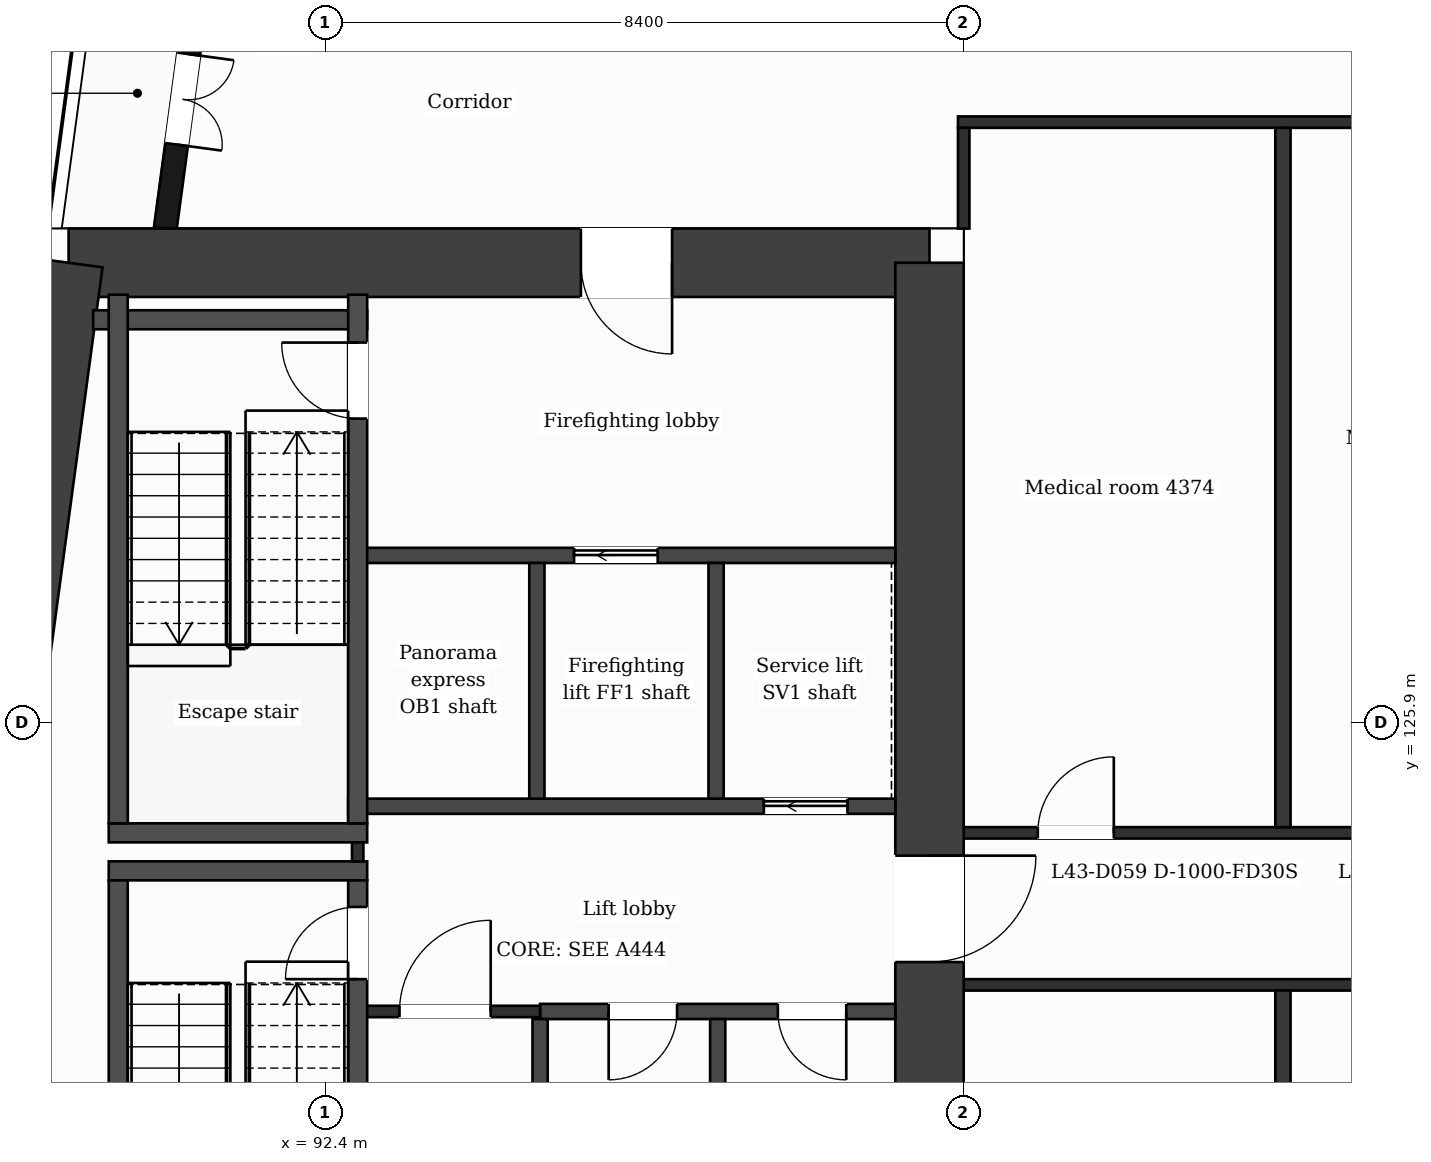
"""IFC4 building model, lengths in metres.
Left out: names, types, materials, properties, quantities, classifications, styles, units other than length and angle.
Written with IfcOpenShell. Run it as: python <this file> out.ifc"""

import sys

from ifc_helpers import new_model, si_unit, direction, frame, frame_2d, origin, place, context, subcontext, project, spatial, rectangle, extrude, element, fill, save


model = new_model("IFC4")
c1 = context("Model", 3, precision=1e-05, world=origin(), true_north=direction((0.0, 1.0)))
c2 = subcontext(c1, "Body", "Model", "MODEL_VIEW")
j1 = project(units=[si_unit("LENGTHUNIT", "METRE"), si_unit("PLANEANGLEUNIT", "RADIAN")], contexts=[c1])
p1 = place(None, origin())
s1 = spatial("IfcSite", under=j1, at=p1, CompositionType="ELEMENT")
p2 = place(p1, origin())
s2 = spatial("IfcBuilding", under=s1, at=p2, CompositionType="ELEMENT")
p3 = place(p2, frame((0.0, 0.0, 181.1)))
s3 = spatial("IfcBuildingStorey", under=s2, at=p3, CompositionType="ELEMENT", Elevation=181.1)
p4 = place(p3, frame((89.024, 131.95, 0.0), z_axis=(0.0, 0.0, 1.0), x_axis=(1.0, 0.0, 0.0)))
e1 = element("IfcWall", 1, at=p4, inside=s3, PredefinedType="SHEAR", context=c2, shape_type="SweptSolid", body=[
    extrude(rectangle(XDim=11.326, YDim=0.9, at=frame_2d((5.663, 0.0))), origin(), (0.0, 0.0, 1.0), 3.7),
])
p5 = place(p4, frame((6.739, 0.0, 0.0)))
e2 = element("IfcOpeningElement", 2, at=p5, cuts=e1, PredefinedType="OPENING", context=c2, shape_type="SweptSolid", body=[
    extrude(rectangle(XDim=1.2, YDim=2.1, at=frame_2d((0.6, 1.05))), frame((0.0, 0.46, 0.0), z_axis=(0.0, -1.0, 0.0), x_axis=(1.0, 0.0, 0.0)), (0.0, 0.0, 1.0), 0.92),
])
p6 = place(p3, frame((100.35, 131.95, 0.0), z_axis=(0.0, 0.0, 1.0), x_axis=(0.0, -1.0, 0.0)))
e3 = element("IfcWall", 3, at=p6, inside=s3, PredefinedType="SHEAR", context=c2, shape_type="SweptSolid", body=[
    extrude(rectangle(XDim=21.1, YDim=0.9, at=frame_2d((10.55, 0.0))), origin(), (0.0, 0.0, 1.0), 3.7),
])
p7 = place(p6, frame((7.8, 0.0, 0.0)))
e4 = element("IfcOpeningElement", 4, at=p7, cuts=e3, PredefinedType="OPENING", context=c2, shape_type="SweptSolid", body=[
    extrude(rectangle(XDim=1.4, YDim=2.1, at=frame_2d((0.7, 1.05))), frame((0.0, 0.46, 0.0), z_axis=(0.0, -1.0, 0.0), x_axis=(1.0, 0.0, 0.0)), (0.0, 0.0, 1.0), 0.92),
])
p8 = place(p3, frame((86.184, 110.85, 0.0), z_axis=(0.0, 0.0, 1.0), x_axis=(0.133410495943, 0.991060865725, 0.0)))
e5 = element("IfcWall", 5, at=p8, inside=s3, PredefinedType="SHEAR", context=c2, shape_type="SweptSolid", body=[
    extrude(rectangle(XDim=21.29, YDim=0.9, at=frame_2d((10.645, 0.0))), origin(), (0.0, 0.0, 1.0), 3.7),
])
p9 = place(p3, frame((91.177, 138.95, 0.0), z_axis=(0.0, 0.0, 1.0), x_axis=(-0.133426664613, -0.991058689065, 0.0)))
e6 = element("IfcWall", 6, at=p9, inside=s3, PredefinedType="SOLIDWALL", context=c2, shape_type="SweptSolid", body=[
    extrude(rectangle(XDim=6.609, YDim=0.3, at=frame_2d((3.305, 0.0))), origin(), (0.0, 0.0, 1.0), 3.38),
])
p10 = place(p9, frame((1.039, 0.0, 0.9)))
e7 = element("IfcOpeningElement", 7, at=p10, cuts=e6, PredefinedType="OPENING", context=c2, shape_type="SweptSolid", body=[
    extrude(rectangle(XDim=1.2, YDim=2.1, at=frame_2d((0.6, 1.05))), frame((0.0, 0.16, 0.0), z_axis=(0.0, -1.0, 0.0), x_axis=(1.0, 0.0, 0.0)), (0.0, 0.0, 1.0), 0.32),
])
p11 = place(p9, frame((4.294, 0.0, 0.0)))
e8 = element("IfcOpeningElement", 8, at=p11, cuts=e6, PredefinedType="OPENING", context=c2, shape_type="SweptSolid", body=[
    extrude(rectangle(XDim=1.2, YDim=2.4, at=frame_2d((0.6, 1.2))), frame((0.0, 0.16, 0.0), z_axis=(0.0, -1.0, 0.0), x_axis=(1.0, 0.0, 0.0)), (0.0, 0.0, 1.0), 0.32),
])
p12 = place(p3, frame((95.227, 122.1, 0.0), z_axis=(0.0, 0.0, 1.0), x_axis=(1.0, 0.0, 0.0)))
e9 = element("IfcWall", 9, at=p12, inside=s3, PredefinedType="PARTITIONING", context=c2, shape_type="SweptSolid", body=[
    extrude(rectangle(XDim=4.673, YDim=0.2, at=frame_2d((2.336, 0.0))), origin(), (0.0, 0.0, 1.0), 3.38),
])
p13 = place(p12, frame((0.902, 0.0, 0.0)))
e10 = element("IfcOpeningElement", 10, at=p13, cuts=e9, PredefinedType="OPENING", context=c2, shape_type="SweptSolid", body=[
    extrude(rectangle(XDim=0.9, YDim=2.1, at=frame_2d((0.45, 1.05))), frame((0.0, 0.11, 0.0), z_axis=(0.0, -1.0, 0.0), x_axis=(1.0, 0.0, 0.0)), (0.0, 0.0, 1.0), 0.22),
])
p14 = place(p12, frame((3.128, 0.0, 0.0)))
e11 = element("IfcOpeningElement", 11, at=p14, cuts=e9, PredefinedType="OPENING", context=c2, shape_type="SweptSolid", body=[
    extrude(rectangle(XDim=0.9, YDim=2.1, at=frame_2d((0.45, 1.05))), frame((0.0, 0.11, 0.0), z_axis=(0.0, -1.0, 0.0), x_axis=(1.0, 0.0, 0.0)), (0.0, 0.0, 1.0), 0.22),
])
p15 = place(p3, frame((92.827, 122.1, 0.0), z_axis=(0.0, 0.0, 1.0), x_axis=(1.0, 0.0, 0.0)))
e12 = element("IfcWall", 12, at=p15, inside=s3, PredefinedType="PARTITIONING", context=c2, shape_type="SweptSolid", body=[
    extrude(rectangle(XDim=2.4, YDim=0.15, at=frame_2d((1.2, 0.0))), origin(), (0.0, 0.0, 1.0), 3.38),
])
p16 = place(p15, frame((0.55, 0.0, 0.0)))
e13 = element("IfcOpeningElement", 13, at=p16, cuts=e12, PredefinedType="OPENING", context=c2, shape_type="SweptSolid", body=[
    extrude(rectangle(XDim=1.2, YDim=2.1, at=frame_2d((0.6, 1.05))), frame((0.0, 0.085, 0.0), z_axis=(0.0, -1.0, 0.0), x_axis=(1.0, 0.0, 0.0)), (0.0, 0.0, 1.0), 0.17),
])
p17 = place(p3, frame((100.8, 122.45, 0.0), z_axis=(0.0, 0.0, 1.0), x_axis=(1.0, 0.0, 0.0)))
e14 = element("IfcWall", 14, at=p17, inside=s3, PredefinedType="PARTITIONING", context=c2, shape_type="SweptSolid", body=[
    extrude(rectangle(XDim=25.2, YDim=0.15, at=frame_2d((12.6, 0.0))), origin(), (0.0, 0.0, 1.0), 3.38),
])
for number, where, z_axis, x_axis in (
    (15, (89.552, 123.95, 0.0), (0.0, 0.0, 1.0), (1.0, 0.0, 0.0)),
    (16, (89.552, 124.45, 0.0), (0.0, 0.0, 1.0), (1.0, 0.0, 0.0)),
):
    element("IfcWall", number, at=place(p3, frame(where, z_axis=z_axis, x_axis=x_axis)), inside=s3, PredefinedType="PARTITIONING", context=c2, shape_type="SweptSolid", body=[
        extrude(rectangle(XDim=3.4, YDim=0.25, at=frame_2d((1.7, 0.0))), origin(), (0.0, 0.0, 1.0), 3.38),
    ])
p18 = place(p3, frame((100.8, 124.45, 0.0), z_axis=(0.0, 0.0, 1.0), x_axis=(1.0, 0.0, 0.0)))
e17 = element("IfcWall", 17, at=p18, inside=s3, PredefinedType="PARTITIONING", context=c2, shape_type="SweptSolid", body=[
    extrude(rectangle(XDim=25.2, YDim=0.15, at=frame_2d((12.6, 0.0))), origin(), (0.0, 0.0, 1.0), 3.38),
])
p19 = place(p18, frame((0.975, 0.0, 0.0)))
e18 = element("IfcOpeningElement", 18, at=p19, cuts=e17, PredefinedType="OPENING", context=c2, shape_type="SweptSolid", body=[
    extrude(rectangle(XDim=1.0, YDim=2.1, at=frame_2d((0.5, 1.05))), frame((0.0, 0.085, 0.0), z_axis=(0.0, -1.0, 0.0), x_axis=(1.0, 0.0, 0.0)), (0.0, 0.0, 1.0), 0.17),
])
p20 = place(p18, frame((6.05, 0.0, 0.0)))
e19 = element("IfcOpeningElement", 19, at=p20, cuts=e17, PredefinedType="OPENING", context=c2, shape_type="SweptSolid", body=[
    extrude(rectangle(XDim=1.0, YDim=2.1, at=frame_2d((0.5, 1.05))), frame((0.0, 0.085, 0.0), z_axis=(0.0, -1.0, 0.0), x_axis=(1.0, 0.0, 0.0)), (0.0, 0.0, 1.0), 0.17),
])
p21 = place(p18, frame((9.27, 0.0, 0.0)))
e20 = element("IfcOpeningElement", 20, at=p21, cuts=e17, PredefinedType="OPENING", context=c2, shape_type="SweptSolid", body=[
    extrude(rectangle(XDim=1.0, YDim=2.1, at=frame_2d((0.5, 1.05))), frame((0.0, 0.085, 0.0), z_axis=(0.0, -1.0, 0.0), x_axis=(1.0, 0.0, 0.0)), (0.0, 0.0, 1.0), 0.17),
])
p22 = place(p18, frame((14.2, 0.0, 0.0)))
e21 = element("IfcOpeningElement", 21, at=p22, cuts=e17, PredefinedType="OPENING", context=c2, shape_type="SweptSolid", body=[
    extrude(rectangle(XDim=1.0, YDim=2.1, at=frame_2d((0.5, 1.05))), frame((0.0, 0.085, 0.0), z_axis=(0.0, -1.0, 0.0), x_axis=(1.0, 0.0, 0.0)), (0.0, 0.0, 1.0), 0.17),
])
p23 = place(p18, frame((18.825, 0.0, 0.0)))
e22 = element("IfcOpeningElement", 22, at=p23, cuts=e17, PredefinedType="OPENING", context=c2, shape_type="SweptSolid", body=[
    extrude(rectangle(XDim=1.0, YDim=2.1, at=frame_2d((0.5, 1.05))), frame((0.0, 0.085, 0.0), z_axis=(0.0, -1.0, 0.0), x_axis=(1.0, 0.0, 0.0)), (0.0, 0.0, 1.0), 0.17),
])
p24 = place(p3, frame((92.702, 124.8, 0.0), z_axis=(0.0, 0.0, 1.0), x_axis=(1.0, 0.0, 0.0)))
e23 = element("IfcWall", 23, at=p24, inside=s3, PredefinedType="PARTITIONING", context=c2, shape_type="SweptSolid", body=[
    extrude(rectangle(XDim=7.198, YDim=0.2, at=frame_2d((3.599, 0.0))), origin(), (0.0, 0.0, 1.0), 3.38),
])
p25 = place(p24, frame((5.469, 0.0, 0.0)))
e24 = element("IfcOpeningElement", 24, at=p25, cuts=e23, PredefinedType="OPENING", context=c2, shape_type="SweptSolid", body=[
    extrude(rectangle(XDim=1.1, YDim=2.1, at=frame_2d((0.55, 1.05))), frame((0.0, 0.11, 0.0), z_axis=(0.0, -1.0, 0.0), x_axis=(1.0, 0.0, 0.0)), (0.0, 0.0, 1.0), 0.22),
])
p26 = place(p3, frame((92.827, 128.1, 0.0), z_axis=(0.0, 0.0, 1.0), x_axis=(1.0, 0.0, 0.0)))
e25 = element("IfcWall", 25, at=p26, inside=s3, PredefinedType="PARTITIONING", context=c2, shape_type="SweptSolid", body=[
    extrude(rectangle(XDim=7.073, YDim=0.2, at=frame_2d((3.537, 0.0))), origin(), (0.0, 0.0, 1.0), 3.38),
])
p27 = place(p26, frame((2.847, 0.0, 0.0)))
e26 = element("IfcOpeningElement", 26, at=p27, cuts=e25, PredefinedType="OPENING", context=c2, shape_type="SweptSolid", body=[
    extrude(rectangle(XDim=1.1, YDim=2.1, at=frame_2d((0.55, 1.05))), frame((0.0, 0.11, 0.0), z_axis=(0.0, -1.0, 0.0), x_axis=(1.0, 0.0, 0.0)), (0.0, 0.0, 1.0), 0.22),
])
p28 = place(p3, frame((89.347, 131.2, 0.0), z_axis=(0.0, 0.0, 1.0), x_axis=(1.0, 0.0, 0.0)))
e27 = element("IfcWall", 27, at=p28, inside=s3, PredefinedType="PARTITIONING", context=c2, shape_type="SweptSolid", body=[
    extrude(rectangle(XDim=3.604, YDim=0.25, at=frame_2d((1.802, 0.0))), origin(), (0.0, 0.0, 1.0), 3.38),
])
p29 = place(p3, frame((100.725, 133.8, 0.0), z_axis=(0.0, 0.0, 1.0), x_axis=(1.0, 0.0, 0.0)))
e28 = element("IfcWall", 28, at=p29, inside=s3, PredefinedType="PARTITIONING", context=c2, shape_type="SweptSolid", body=[
    extrude(rectangle(XDim=25.35, YDim=0.15, at=frame_2d((12.675, 0.0))), origin(), (0.0, 0.0, 1.0), 3.38),
])
p30 = place(p29, frame((10.7, 0.0, 0.0)))
e29 = element("IfcOpeningElement", 29, at=p30, cuts=e28, PredefinedType="OPENING", context=c2, shape_type="SweptSolid", body=[
    extrude(rectangle(XDim=1.0, YDim=2.1, at=frame_2d((0.5, 1.05))), frame((0.0, 0.085, 0.0), z_axis=(0.0, -1.0, 0.0), x_axis=(1.0, 0.0, 0.0)), (0.0, 0.0, 1.0), 0.17),
])
p31 = place(p3, frame((89.677, 116.87, 0.0), z_axis=(0.0, 0.0, 1.0), x_axis=(0.0, 1.0, 0.0)))
e30 = element("IfcWall", 30, at=p31, inside=s3, PredefinedType="PARTITIONING", context=c2, shape_type="SweptSolid", body=[
    extrude(rectangle(XDim=6.955, YDim=0.25, at=frame_2d((3.478, 0.0))), origin(), (0.0, 0.0, 1.0), 3.38),
])
p32 = place(p3, frame((89.677, 124.575, 0.0), z_axis=(0.0, 0.0, 1.0), x_axis=(0.0, 1.0, 0.0)))
e31 = element("IfcWall", 31, at=p32, inside=s3, PredefinedType="PARTITIONING", context=c2, shape_type="SweptSolid", body=[
    extrude(rectangle(XDim=6.955, YDim=0.25, at=frame_2d((3.478, 0.0))), origin(), (0.0, 0.0, 1.0), 3.38),
])
p33 = place(p3, frame((92.827, 124.075, 0.0), z_axis=(0.0, 0.0, 1.0), x_axis=(0.0, 1.0, 0.0)))
e32 = element("IfcWall", 32, at=p33, inside=s3, PredefinedType="PARTITIONING", context=c2, shape_type="SweptSolid", body=[
    extrude(rectangle(XDim=0.25, YDim=0.15, at=frame_2d((0.125, 0.0))), origin(), (0.0, 0.0, 1.0), 3.38),
])
p34 = place(p3, frame((92.827, 116.87, 0.0), z_axis=(0.0, 0.0, 1.0), x_axis=(0.0, 1.0, 0.0)))
e33 = element("IfcWall", 33, at=p34, inside=s3, PredefinedType="PARTITIONING", context=c2, shape_type="SweptSolid", body=[
    extrude(rectangle(XDim=6.955, YDim=0.25, at=frame_2d((3.478, 0.0))), origin(), (0.0, 0.0, 1.0), 3.38),
])
p35 = place(p34, frame((5.655, 0.0, 0.0)))
e34 = element("IfcOpeningElement", 34, at=p35, cuts=e33, PredefinedType="OPENING", context=c2, shape_type="SweptSolid", body=[
    extrude(rectangle(XDim=0.95, YDim=2.1, at=frame_2d((0.475, 1.05))), frame((0.0, 0.135, 0.0), z_axis=(0.0, -1.0, 0.0), x_axis=(1.0, 0.0, 0.0)), (0.0, 0.0, 1.0), 0.27),
])
p36 = place(p3, frame((92.827, 124.575, 0.0), z_axis=(0.0, 0.0, 1.0), x_axis=(0.0, 1.0, 0.0)))
e35 = element("IfcWall", 35, at=p36, inside=s3, PredefinedType="PARTITIONING", context=c2, shape_type="SweptSolid", body=[
    extrude(rectangle(XDim=6.955, YDim=0.25, at=frame_2d((3.478, 0.0))), origin(), (0.0, 0.0, 1.0), 3.38),
])
p37 = place(p36, frame((5.325, 0.0, 0.0)))
e36 = element("IfcOpeningElement", 36, at=p37, cuts=e35, PredefinedType="OPENING", context=c2, shape_type="SweptSolid", body=[
    extrude(rectangle(XDim=1.0, YDim=2.1, at=frame_2d((0.5, 1.05))), frame((0.0, 0.135, 0.0), z_axis=(0.0, -1.0, 0.0), x_axis=(1.0, 0.0, 0.0)), (0.0, 0.0, 1.0), 0.27),
])
p38 = place(p3, frame((95.185, 124.9, 0.0), z_axis=(0.0, 0.0, 1.0), x_axis=(0.0, 1.0, 0.0)))
e37 = element("IfcWall", 37, at=p38, inside=s3, PredefinedType="PARTITIONING", context=c2, shape_type="SweptSolid", body=[
    extrude(rectangle(XDim=3.1, YDim=0.2, at=frame_2d((1.55, 0.0))), origin(), (0.0, 0.0, 1.0), 3.38),
])
p39 = place(p3, frame((95.227, 116.87, 0.0), z_axis=(0.0, 0.0, 1.0), x_axis=(0.0, 1.0, 0.0)))
e38 = element("IfcWall", 38, at=p39, inside=s3, PredefinedType="PARTITIONING", context=c2, shape_type="SweptSolid", body=[
    extrude(rectangle(XDim=5.13, YDim=0.2, at=frame_2d((2.565, 0.0))), origin(), (0.0, 0.0, 1.0), 3.38),
])
p40 = place(p39, frame((0.68, 0.0, 0.0)))
e39 = element("IfcOpeningElement", 39, at=p40, cuts=e38, PredefinedType="OPENING", context=c2, shape_type="SweptSolid", body=[
    extrude(rectangle(XDim=0.9, YDim=2.1, at=frame_2d((0.45, 1.05))), frame((0.0, 0.11, 0.0), z_axis=(0.0, -1.0, 0.0), x_axis=(1.0, 0.0, 0.0)), (0.0, 0.0, 1.0), 0.22),
])
for number, where, z_axis, x_axis in (
    (40, (97.542, 124.9, 0.0), (0.0, 0.0, 1.0), (0.0, 1.0, 0.0)),
    (41, (97.563, 118.9, 0.0), (0.0, 0.0, 1.0), (0.0, 1.0, 0.0)),
):
    element("IfcWall", number, at=place(p3, frame(where, z_axis=z_axis, x_axis=x_axis)), inside=s3, PredefinedType="PARTITIONING", context=c2, shape_type="SweptSolid", body=[
        extrude(rectangle(XDim=3.1, YDim=0.2, at=frame_2d((1.55, 0.0))), origin(), (0.0, 0.0, 1.0), 3.38),
    ])
p41 = place(p3, frame((100.8, 132.4, 0.0), z_axis=(0.0, 0.0, 1.0), x_axis=(0.0, 1.0, 0.0)))
e42 = element("IfcWall", 42, at=p41, inside=s3, PredefinedType="PARTITIONING", context=c2, shape_type="SweptSolid", body=[
    extrude(rectangle(XDim=1.325, YDim=0.15, at=frame_2d((0.663, 0.0))), origin(), (0.0, 0.0, 1.0), 3.38),
])
p42 = place(p3, frame((105.0, 109.075, 0.0), z_axis=(0.0, 0.0, 1.0), x_axis=(0.0, 1.0, 0.0)))
e43 = element("IfcWall", 43, at=p42, inside=s3, PredefinedType="PARTITIONING", context=c2, shape_type="SweptSolid", body=[
    extrude(rectangle(XDim=13.3, YDim=0.2, at=frame_2d((6.65, 0.0))), origin(), (0.0, 0.0, 1.0), 3.38),
])
p43 = place(p3, frame((105.0, 124.525, 0.0), z_axis=(0.0, 0.0, 1.0), x_axis=(0.0, 1.0, 0.0)))
e44 = element("IfcWall", 44, at=p43, inside=s3, PredefinedType="PARTITIONING", context=c2, shape_type="SweptSolid", body=[
    extrude(rectangle(XDim=9.2, YDim=0.2, at=frame_2d((4.6, 0.0))), origin(), (0.0, 0.0, 1.0), 3.38),
])
p44 = place(p11, origin())
e45 = element("IfcDoor", 45, at=p44, inside=s3, OperationType="DOUBLE_DOOR_SINGLE_SWING", PredefinedType="DOOR", context=c2, shape_type="SweptSolid", body=[
    extrude(rectangle(XDim=1.2, YDim=2.4, at=frame_2d((0.6, 1.2))), frame((0.0, 0.025, 0.0), z_axis=(0.0, -1.0, 0.0), x_axis=(1.0, 0.0, 0.0)), (0.0, 0.0, 1.0), 0.05),
])
fill(e8, e45)
p45 = place(p16, origin())
e46 = element("IfcDoor", 46, at=p45, inside=s3, OperationType="SINGLE_SWING_RIGHT", PredefinedType="DOOR", context=c2, shape_type="SweptSolid", body=[
    extrude(rectangle(XDim=1.2, YDim=2.1, at=frame_2d((0.6, 1.05))), frame((0.0, 0.025, 0.0), z_axis=(0.0, -1.0, 0.0), x_axis=(1.0, 0.0, 0.0)), (0.0, 0.0, 1.0), 0.05),
])
fill(e13, e46)
p46 = place(p27, origin())
e47 = element("IfcDoor", 47, at=p46, inside=s3, OperationType="SLIDING_TO_LEFT", PredefinedType="DOOR", context=c2, shape_type="SweptSolid", body=[
    extrude(rectangle(XDim=1.1, YDim=2.1, at=frame_2d((0.55, 1.05))), frame((0.0, 0.025, 0.0), z_axis=(0.0, -1.0, 0.0), x_axis=(1.0, 0.0, 0.0)), (0.0, 0.0, 1.0), 0.05),
])
fill(e26, e47)
p47 = place(p25, origin())
e48 = element("IfcDoor", 48, at=p47, inside=s3, OperationType="SLIDING_TO_LEFT", PredefinedType="DOOR", context=c2, shape_type="SweptSolid", body=[
    extrude(rectangle(XDim=1.1, YDim=2.1, at=frame_2d((0.55, 1.05))), frame((0.0, 0.025, 0.0), z_axis=(0.0, -1.0, 0.0), x_axis=(1.0, 0.0, 0.0)), (0.0, 0.0, 1.0), 0.05),
])
fill(e24, e48)
p48 = place(p13, origin())
e49 = element("IfcDoor", 49, at=p48, inside=s3, OperationType="SINGLE_SWING_LEFT", PredefinedType="DOOR", context=c2, shape_type="SweptSolid", body=[
    extrude(rectangle(XDim=0.9, YDim=2.1, at=frame_2d((0.45, 1.05))), frame((0.0, 0.025, 0.0), z_axis=(0.0, -1.0, 0.0), x_axis=(1.0, 0.0, 0.0)), (0.0, 0.0, 1.0), 0.05),
])
fill(e10, e49)
p49 = place(p14, origin())
e50 = element("IfcDoor", 50, at=p49, inside=s3, OperationType="SINGLE_SWING_RIGHT", PredefinedType="DOOR", context=c2, shape_type="SweptSolid", body=[
    extrude(rectangle(XDim=0.9, YDim=2.1, at=frame_2d((0.45, 1.05))), frame((0.0, 0.025, 0.0), z_axis=(0.0, -1.0, 0.0), x_axis=(1.0, 0.0, 0.0)), (0.0, 0.0, 1.0), 0.05),
])
fill(e11, e50)
p50 = place(p35, origin())
e51 = element("IfcDoor", 51, at=p50, inside=s3, OperationType="SINGLE_SWING_LEFT", PredefinedType="DOOR", context=c2, shape_type="SweptSolid", body=[
    extrude(rectangle(XDim=0.95, YDim=2.1, at=frame_2d((0.475, 1.05))), frame((0.0, 0.025, 0.0), z_axis=(0.0, -1.0, 0.0), x_axis=(1.0, 0.0, 0.0)), (0.0, 0.0, 1.0), 0.05),
])
fill(e34, e51)
p51 = place(p37, origin())
e52 = element("IfcDoor", 52, at=p51, inside=s3, OperationType="SINGLE_SWING_RIGHT", PredefinedType="DOOR", context=c2, shape_type="SweptSolid", body=[
    extrude(rectangle(XDim=1.0, YDim=2.1, at=frame_2d((0.5, 1.05))), frame((0.0, 0.025, 0.0), z_axis=(0.0, -1.0, 0.0), x_axis=(1.0, 0.0, 0.0)), (0.0, 0.0, 1.0), 0.05),
])
fill(e36, e52)
p52 = place(p19, origin())
e53 = element("IfcDoor", 53, at=p52, inside=s3, OperationType="SINGLE_SWING_RIGHT", PredefinedType="DOOR", context=c2, shape_type="SweptSolid", body=[
    extrude(rectangle(XDim=1.0, YDim=2.1, at=frame_2d((0.5, 1.05))), frame((0.0, 0.025, 0.0), z_axis=(0.0, -1.0, 0.0), x_axis=(1.0, 0.0, 0.0)), (0.0, 0.0, 1.0), 0.05),
])
fill(e18, e53)
p53 = place(p5, origin())
e54 = element("IfcDoor", 54, at=p53, inside=s3, OperationType="SINGLE_SWING_RIGHT", PredefinedType="DOOR", context=c2, shape_type="SweptSolid", body=[
    extrude(rectangle(XDim=1.2, YDim=2.1, at=frame_2d((0.6, 1.05))), frame((0.0, 0.025, 0.0), z_axis=(0.0, -1.0, 0.0), x_axis=(1.0, 0.0, 0.0)), (0.0, 0.0, 1.0), 0.05),
])
fill(e2, e54)
p54 = place(p7, origin())
e55 = element("IfcDoor", 55, at=p54, inside=s3, OperationType="SINGLE_SWING_LEFT", PredefinedType="DOOR", context=c2, shape_type="SweptSolid", body=[
    extrude(rectangle(XDim=1.4, YDim=2.1, at=frame_2d((0.7, 1.05))), frame((0.0, 0.025, 0.0), z_axis=(0.0, -1.0, 0.0), x_axis=(1.0, 0.0, 0.0)), (0.0, 0.0, 1.0), 0.05),
])
fill(e4, e55)
save(model, sys.argv[1])
